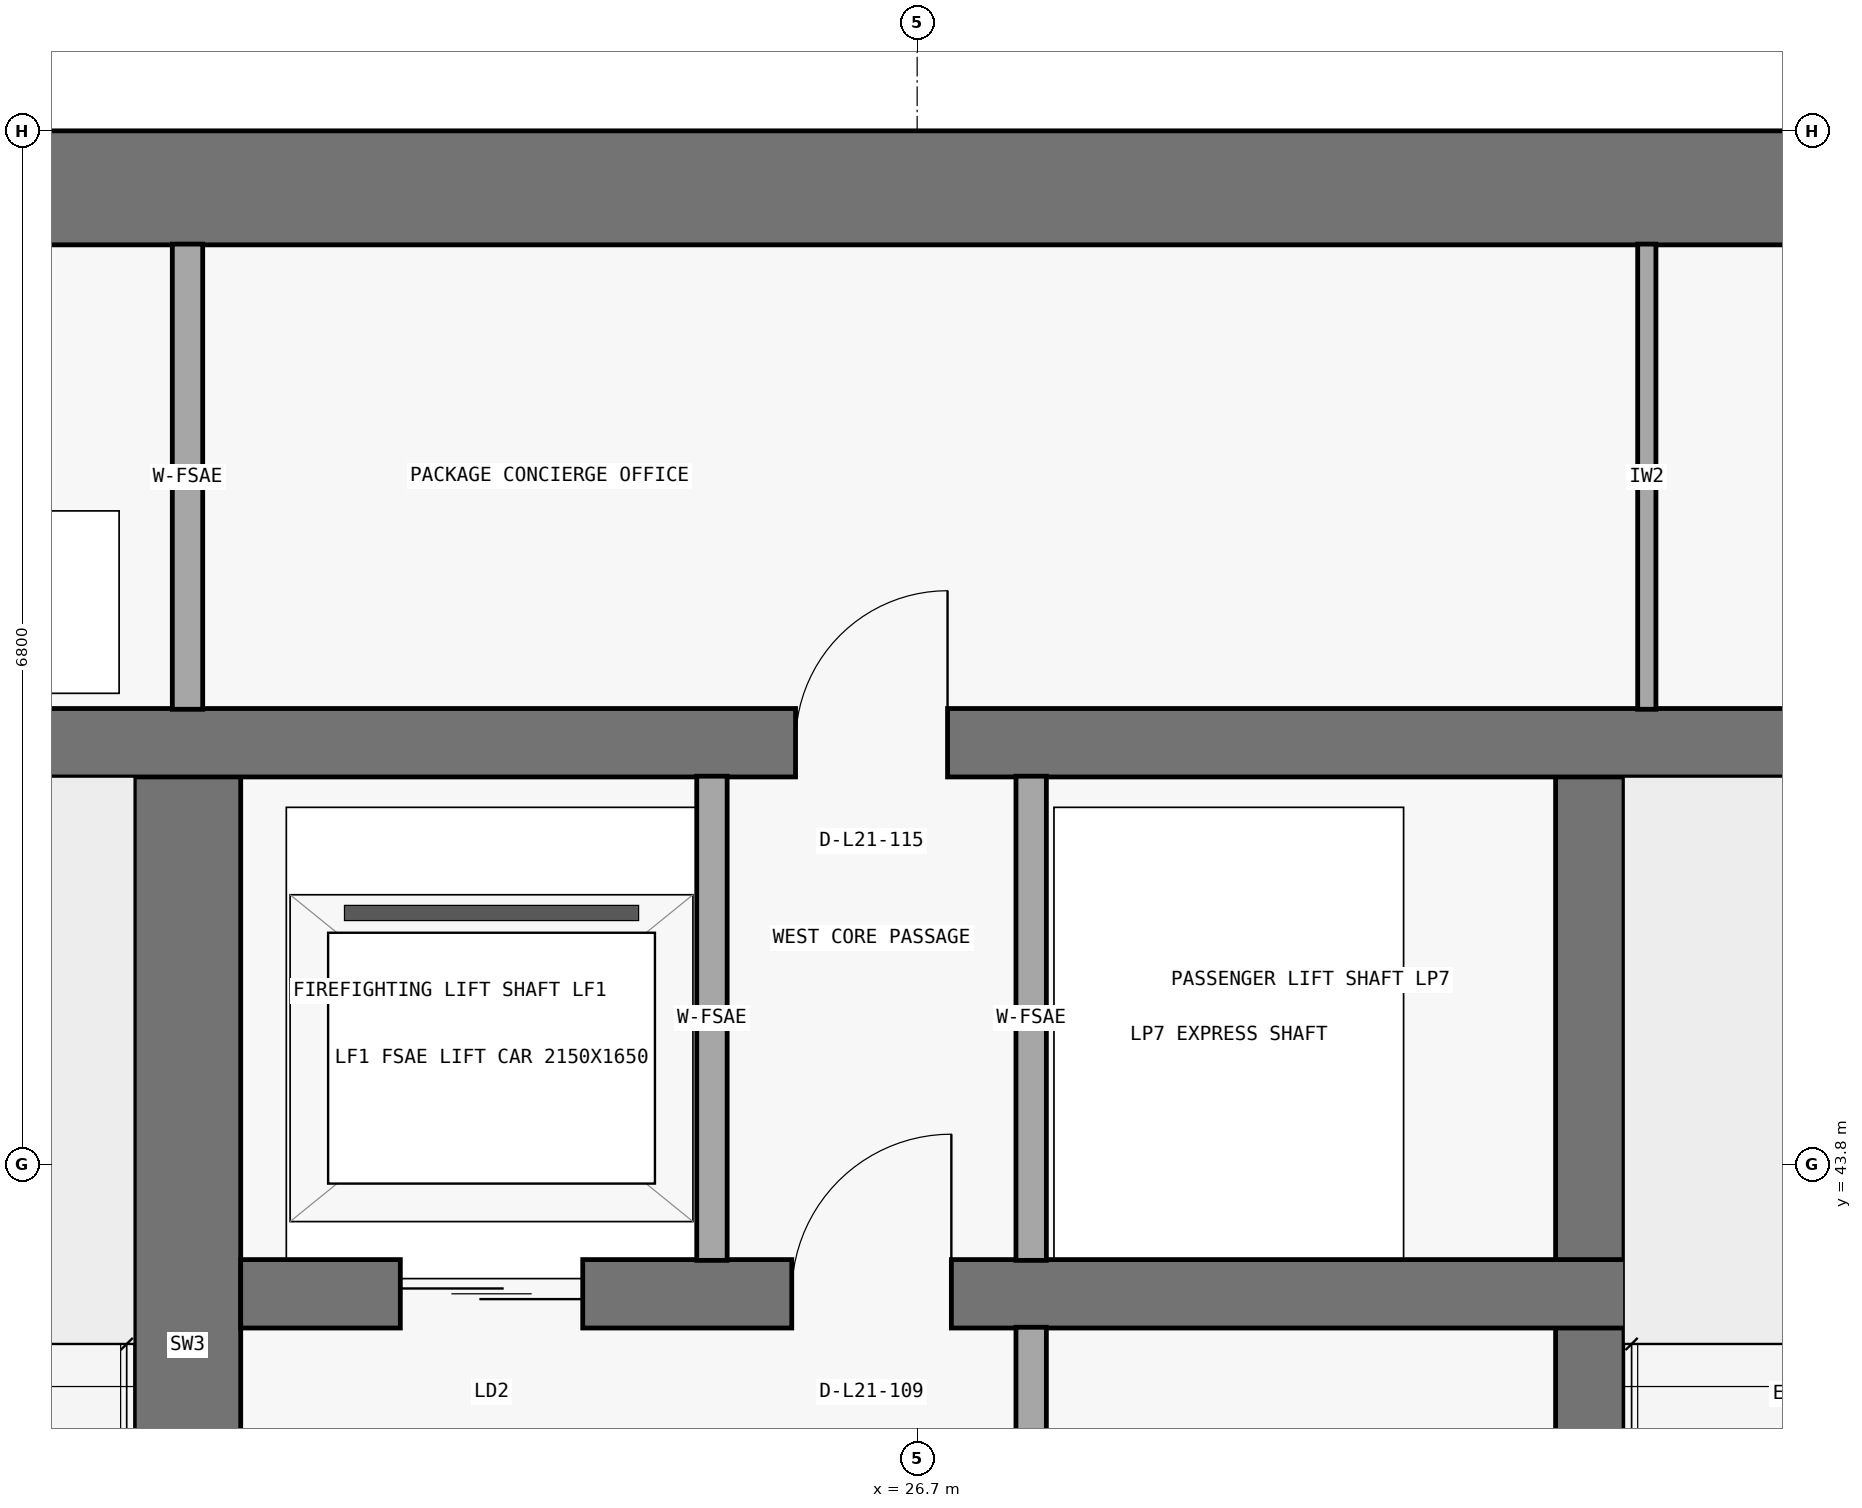
"""IFC4 building model, lengths in metres.
Left out: names, types, materials, properties, quantities, classifications, styles, units other than length and angle.
Written with IfcOpenShell. Run it as: python <this file> out.ifc"""

import sys

from ifc_helpers import new_model, si_unit, direction, frame, frame_2d, origin, place, context, subcontext, project, spatial, rectangle, extrude, element, fill, save


model = new_model("IFC4")
c1 = context("Model", 3, precision=1e-05, world=origin(), true_north=direction((0.0, 1.0)))
c2 = subcontext(c1, "Body", "Model", "MODEL_VIEW")
j1 = project(units=[si_unit("LENGTHUNIT", "METRE"), si_unit("PLANEANGLEUNIT", "RADIAN")], contexts=[c1])
p1 = place(None, origin())
s1 = spatial("IfcSite", under=j1, at=p1, CompositionType="ELEMENT")
p2 = place(p1, origin())
s2 = spatial("IfcBuilding", under=s1, at=p2, CompositionType="ELEMENT")
p3 = place(p2, frame((0.0, 0.0, 79.5)))
s3 = spatial("IfcBuildingStorey", under=s2, at=p3, CompositionType="ELEMENT", Elevation=79.5)
p4 = place(p3, frame((17.75, 50.225, 0.0), z_axis=(0.0, 0.0, 1.0), x_axis=(1.0, 0.0, 0.0)))
e1 = element("IfcWall", 1, at=p4, inside=s3, PredefinedType="SHEAR", context=c2, shape_type="SweptSolid", body=[
    extrude(rectangle(XDim=42.3, YDim=0.75, at=frame_2d((21.15, 0.0))), origin(), (0.0, 0.0, 1.0), 4.85),
])
p5 = place(p3, frame((21.9, 36.9, 0.0), z_axis=(0.0, 0.0, 1.0), x_axis=(0.0, 1.0, 0.0)))
e2 = element("IfcWall", 2, at=p5, inside=s3, PredefinedType="SHEAR", context=c2, shape_type="SweptSolid", body=[
    extrude(rectangle(XDim=9.675, YDim=0.7, at=frame_2d((4.837, 0.0))), origin(), (0.0, 0.0, 1.0), 4.85),
])
p6 = place(p5, frame((0.65, 0.0, 0.0)))
e3 = element("IfcOpeningElement", 3, at=p6, cuts=e2, PredefinedType="OPENING", context=c2, shape_type="SweptSolid", body=[
    extrude(rectangle(XDim=1.1, YDim=2.15, at=frame_2d((0.55, 1.075))), frame((0.0, 0.36, 0.0), z_axis=(0.0, -1.0, 0.0), x_axis=(1.0, 0.0, 0.0)), (0.0, 0.0, 1.0), 0.72),
])
p7 = place(p3, frame((31.125, 36.9, 0.0), z_axis=(0.0, 0.0, 1.0), x_axis=(0.0, 1.0, 0.0)))
e4 = element("IfcWall", 4, at=p7, inside=s3, PredefinedType="SHEAR", context=c2, shape_type="SweptSolid", body=[
    extrude(rectangle(XDim=9.675, YDim=0.45, at=frame_2d((4.837, 0.0))), origin(), (0.0, 0.0, 1.0), 4.85),
])
p8 = place(p3, frame((22.25, 42.95, 0.0), z_axis=(0.0, 0.0, 1.0), x_axis=(1.0, 0.0, 0.0)))
e5 = element("IfcWall", 5, at=p8, inside=s3, PredefinedType="SHEAR", context=c2, shape_type="SweptSolid", body=[
    extrude(rectangle(XDim=33.3, YDim=0.45, at=frame_2d((16.65, 0.0))), origin(), (0.0, 0.0, 1.0), 4.85),
])
p9 = place(p8, frame((1.05, 0.0, 0.0)))
e6 = element("IfcOpeningElement", 6, at=p9, cuts=e5, PredefinedType="OPENING", context=c2, shape_type="SweptSolid", body=[
    extrude(rectangle(XDim=1.2, YDim=2.2, at=frame_2d((0.6, 1.1))), frame((0.0, 0.235, 0.0), z_axis=(0.0, -1.0, 0.0), x_axis=(1.0, 0.0, 0.0)), (0.0, 0.0, 1.0), 0.47),
])
p10 = place(p8, frame((31.05, 0.0, 0.0)))
e7 = element("IfcOpeningElement", 7, at=p10, cuts=e5, PredefinedType="OPENING", context=c2, shape_type="SweptSolid", body=[
    extrude(rectangle(XDim=1.2, YDim=2.2, at=frame_2d((0.6, 1.1))), frame((0.0, 0.235, 0.0), z_axis=(0.0, -1.0, 0.0), x_axis=(1.0, 0.0, 0.0)), (0.0, 0.0, 1.0), 0.47),
])
p11 = place(p8, frame((13.5, 0.0, 0.0)))
e8 = element("IfcOpeningElement", 8, at=p11, cuts=e5, PredefinedType="OPENING", context=c2, shape_type="SweptSolid", body=[
    extrude(rectangle(XDim=1.1, YDim=2.2, at=frame_2d((0.55, 1.1))), frame((0.0, 0.235, 0.0), z_axis=(0.0, -1.0, 0.0), x_axis=(1.0, 0.0, 0.0)), (0.0, 0.0, 1.0), 0.47),
])
p12 = place(p8, frame((16.1, 0.0, 0.0)))
e9 = element("IfcOpeningElement", 9, at=p12, cuts=e5, PredefinedType="OPENING", context=c2, shape_type="SweptSolid", body=[
    extrude(rectangle(XDim=1.1, YDim=2.2, at=frame_2d((0.55, 1.1))), frame((0.0, 0.235, 0.0), z_axis=(0.0, -1.0, 0.0), x_axis=(1.0, 0.0, 0.0)), (0.0, 0.0, 1.0), 0.47),
])
p13 = place(p8, frame((18.7, 0.0, 0.0)))
e10 = element("IfcOpeningElement", 10, at=p13, cuts=e5, PredefinedType="OPENING", context=c2, shape_type="SweptSolid", body=[
    extrude(rectangle(XDim=1.1, YDim=2.2, at=frame_2d((0.55, 1.1))), frame((0.0, 0.235, 0.0), z_axis=(0.0, -1.0, 0.0), x_axis=(1.0, 0.0, 0.0)), (0.0, 0.0, 1.0), 0.47),
])
p14 = place(p8, frame((3.625, 0.0, 0.0)))
e11 = element("IfcOpeningElement", 11, at=p14, cuts=e5, PredefinedType="OPENING", context=c2, shape_type="SweptSolid", body=[
    extrude(rectangle(XDim=1.05, YDim=2.15, at=frame_2d((0.525, 1.075))), frame((0.0, 0.235, 0.0), z_axis=(0.0, -1.0, 0.0), x_axis=(1.0, 0.0, 0.0)), (0.0, 0.0, 1.0), 0.47),
])
p15 = place(p8, frame((28.675, 0.0, 0.0)))
e12 = element("IfcOpeningElement", 12, at=p15, cuts=e5, PredefinedType="OPENING", context=c2, shape_type="SweptSolid", body=[
    extrude(rectangle(XDim=1.05, YDim=2.15, at=frame_2d((0.525, 1.075))), frame((0.0, 0.235, 0.0), z_axis=(0.0, -1.0, 0.0), x_axis=(1.0, 0.0, 0.0)), (0.0, 0.0, 1.0), 0.47),
])
p16 = place(p3, frame((18.2, 46.575, 0.0), z_axis=(0.0, 0.0, 1.0), x_axis=(1.0, 0.0, 0.0)))
e13 = element("IfcWall", 13, at=p16, inside=s3, PredefinedType="SHEAR", context=c2, shape_type="SweptSolid", body=[
    extrude(rectangle(XDim=41.4, YDim=0.45, at=frame_2d((20.7, 0.0))), origin(), (0.0, 0.0, 1.0), 4.85),
])
p17 = place(p16, frame((7.7, 0.0, 0.0)))
e14 = element("IfcOpeningElement", 14, at=p17, cuts=e13, PredefinedType="OPENING", context=c2, shape_type="SweptSolid", body=[
    extrude(rectangle(XDim=1.0, YDim=2.2, at=frame_2d((0.5, 1.1))), frame((0.0, 0.235, 0.0), z_axis=(0.0, -1.0, 0.0), x_axis=(1.0, 0.0, 0.0)), (0.0, 0.0, 1.0), 0.47),
])
p18 = place(p16, frame((32.725, 0.0, 0.0)))
e15 = element("IfcOpeningElement", 15, at=p18, cuts=e13, PredefinedType="OPENING", context=c2, shape_type="SweptSolid", body=[
    extrude(rectangle(XDim=1.05, YDim=2.15, at=frame_2d((0.525, 1.075))), frame((0.0, 0.235, 0.0), z_axis=(0.0, -1.0, 0.0), x_axis=(1.0, 0.0, 0.0)), (0.0, 0.0, 1.0), 0.47),
])
p19 = place(p3, frame((21.9, 46.795, 0.0), z_axis=(0.0, 0.0, 1.0), x_axis=(0.0, 1.0, 0.0)))
e16 = element("IfcWall", 16, at=p19, inside=s3, PredefinedType="PARTITIONING", context=c2, shape_type="SweptSolid", body=[
    extrude(rectangle(XDim=3.06, YDim=0.2, at=frame_2d((1.53, 0.0))), origin(), (0.0, 0.0, 1.0), 4.85),
])
p20 = place(p3, frame((25.35, 43.17, 0.0), z_axis=(0.0, 0.0, 1.0), x_axis=(0.0, 1.0, 0.0)))
e17 = element("IfcWall", 17, at=p20, inside=s3, PredefinedType="PARTITIONING", context=c2, shape_type="SweptSolid", body=[
    extrude(rectangle(XDim=3.185, YDim=0.2, at=frame_2d((1.593, 0.0))), origin(), (0.0, 0.0, 1.0), 4.85),
])
p21 = place(p3, frame((27.45, 37.345, 0.0), z_axis=(0.0, 0.0, 1.0), x_axis=(0.0, 1.0, 0.0)))
e18 = element("IfcWall", 18, at=p21, inside=s3, PredefinedType="PARTITIONING", context=c2, shape_type="SweptSolid", body=[
    extrude(rectangle(XDim=5.385, YDim=0.2, at=frame_2d((2.692, 0.0))), origin(), (0.0, 0.0, 1.0), 4.85),
])
p22 = place(p3, frame((27.45, 43.17, 0.0), z_axis=(0.0, 0.0, 1.0), x_axis=(0.0, 1.0, 0.0)))
e19 = element("IfcWall", 19, at=p22, inside=s3, PredefinedType="PARTITIONING", context=c2, shape_type="SweptSolid", body=[
    extrude(rectangle(XDim=3.185, YDim=0.2, at=frame_2d((1.593, 0.0))), origin(), (0.0, 0.0, 1.0), 4.85),
])
p23 = place(p3, frame((31.5, 46.795, 0.0), z_axis=(0.0, 0.0, 1.0), x_axis=(0.0, 1.0, 0.0)))
e20 = element("IfcWall", 20, at=p23, inside=s3, PredefinedType="PARTITIONING", context=c2, shape_type="SweptSolid", body=[
    extrude(rectangle(XDim=3.06, YDim=0.12, at=frame_2d((1.53, 0.0))), origin(), (0.0, 0.0, 1.0), 4.85),
])
p24 = place(p9, origin())
e21 = element("IfcDoor", 21, at=p24, inside=s3, OperationType="DOUBLE_DOOR_SLIDING", PredefinedType="DOOR", context=c2, shape_type="SweptSolid", body=[
    extrude(rectangle(XDim=1.2, YDim=2.2, at=frame_2d((0.6, 1.1))), frame((0.0, 0.025, 0.0), z_axis=(0.0, -1.0, 0.0), x_axis=(1.0, 0.0, 0.0)), (0.0, 0.0, 1.0), 0.05),
])
fill(e6, e21)
p25 = place(p14, origin())
e22 = element("IfcDoor", 22, at=p25, inside=s3, OperationType="SINGLE_SWING_RIGHT", PredefinedType="DOOR", context=c2, shape_type="SweptSolid", body=[
    extrude(rectangle(XDim=1.05, YDim=2.15, at=frame_2d((0.525, 1.075))), frame((0.0, 0.025, 0.0), z_axis=(0.0, -1.0, 0.0), x_axis=(1.0, 0.0, 0.0)), (0.0, 0.0, 1.0), 0.05),
])
fill(e11, e22)
p26 = place(p17, origin())
e23 = element("IfcDoor", 23, at=p26, inside=s3, OperationType="SINGLE_SWING_RIGHT", PredefinedType="DOOR", context=c2, shape_type="SweptSolid", body=[
    extrude(rectangle(XDim=1.0, YDim=2.2, at=frame_2d((0.5, 1.1))), frame((0.0, 0.025, 0.0), z_axis=(0.0, -1.0, 0.0), x_axis=(1.0, 0.0, 0.0)), (0.0, 0.0, 1.0), 0.05),
])
fill(e14, e23)
save(model, sys.argv[1])
